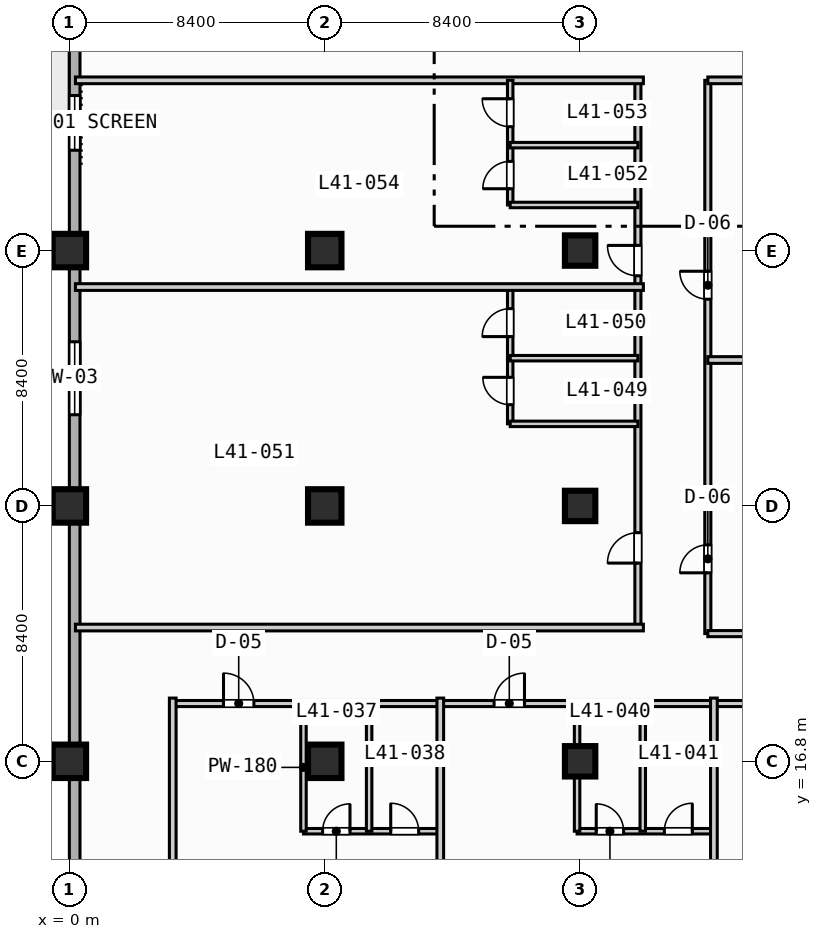
"""IFC4 building model, lengths in metres.
Left out: names, types, materials, properties, quantities, classifications, styles, units other than length and angle.
Written with IfcOpenShell. Run it as: python <this file> out.ifc"""

import sys

from ifc_helpers import new_model, si_unit, direction, frame, frame_2d, origin, origin_2d, place, context, subcontext, project, spatial, rectangle, extrude, element, fill, save


model = new_model("IFC4")
c1 = context("Model", 3, precision=1e-05, world=origin(), true_north=direction((0.0, 1.0)))
c2 = subcontext(c1, "Body", "Model", "MODEL_VIEW")
j1 = project(units=[si_unit("LENGTHUNIT", "METRE"), si_unit("PLANEANGLEUNIT", "RADIAN")], contexts=[c1])
p1 = place(None, origin())
s1 = spatial("IfcSite", under=j1, at=p1, CompositionType="ELEMENT")
p2 = place(p1, origin())
s2 = spatial("IfcBuilding", under=s1, at=p2, CompositionType="ELEMENT")
p3 = place(p2, frame((0.0, 0.0, 171.7)))
s3 = spatial("IfcBuildingStorey", under=s2, at=p3, CompositionType="ELEMENT", Elevation=171.7)
for number, where, z_axis, x_axis in (
    (1, (0.0, 16.8, 0.0), (0.0, 0.0, 1.0), (1.0, 0.0, 0.0)),
    (2, (0.0, 25.2, 0.0), (0.0, 0.0, 1.0), (1.0, 0.0, 0.0)),
    (3, (0.0, 33.6, 0.0), (0.0, 0.0, 1.0), (1.0, 0.0, 0.0)),
    (4, (8.4, 16.8, 0.0), (0.0, 0.0, 1.0), (1.0, 0.0, 0.0)),
    (5, (8.4, 25.2, 0.0), (0.0, 0.0, 1.0), (1.0, 0.0, 0.0)),
    (6, (8.4, 33.6, 0.0), (0.0, 0.0, 1.0), (1.0, 0.0, 0.0)),
):
    element("IfcColumn", number, at=place(p3, frame(where, z_axis=z_axis, x_axis=x_axis)), inside=s3, PredefinedType="COLUMN", context=c2, shape_type="SweptSolid", body=[
        extrude(rectangle(XDim=1.1, YDim=1.1, at=origin_2d()), origin(), (0.0, 0.0, 1.0), 3.7),
    ])
for number, where, z_axis, x_axis in (
    (7, (16.8, 16.8, 0.0), (0.0, 0.0, 1.0), (1.0, 0.0, 0.0)),
    (8, (16.8, 25.2, 0.0), (0.0, 0.0, 1.0), (1.0, 0.0, 0.0)),
    (9, (16.8, 33.6, 0.0), (0.0, 0.0, 1.0), (1.0, 0.0, 0.0)),
):
    element("IfcColumn", number, at=place(p3, frame(where, z_axis=z_axis, x_axis=x_axis)), inside=s3, PredefinedType="COLUMN", context=c2, shape_type="SweptSolid", body=[
        extrude(rectangle(XDim=1.0, YDim=1.0, at=origin_2d()), origin(), (0.0, 0.0, 1.0), 3.7),
    ])
p4 = place(p3, frame((0.175, 3.175, 0.0), z_axis=(0.0, 0.0, 1.0), x_axis=(0.0, 1.0, 0.0)))
e10 = element("IfcWall", 10, at=p4, inside=s3, PredefinedType="STANDARD", context=c2, shape_type="SweptSolid", body=[
    extrude(rectangle(XDim=69.25, YDim=0.35, at=frame_2d((34.625, 0.0))), origin(), (0.0, 0.0, 1.0), 3.47),
])
p5 = place(p4, frame((42.325, 0.0, 0.0)))
e11 = element("IfcOpeningElement", 11, at=p5, cuts=e10, PredefinedType="OPENING", context=c2, shape_type="SweptSolid", body=[
    extrude(rectangle(XDim=1.4, YDim=2.2, at=frame_2d((0.7, 1.1))), frame((0.0, 0.185, 0.0), z_axis=(0.0, -1.0, 0.0), x_axis=(1.0, 0.0, 0.0)), (0.0, 0.0, 1.0), 0.37),
])
p6 = place(p4, frame((25.025, 0.0, 0.85)))
e12 = element("IfcOpeningElement", 12, at=p6, cuts=e10, PredefinedType="OPENING", context=c2, shape_type="SweptSolid", body=[
    extrude(rectangle(XDim=2.4, YDim=1.95, at=frame_2d((1.2, 0.975))), frame((0.0, 0.185, 0.0), z_axis=(0.0, -1.0, 0.0), x_axis=(1.0, 0.0, 0.0)), (0.0, 0.0, 1.0), 0.37),
])
p7 = place(p4, frame((33.725, 0.0, 0.85)))
e13 = element("IfcOpeningElement", 13, at=p7, cuts=e10, PredefinedType="OPENING", context=c2, shape_type="SweptSolid", body=[
    extrude(rectangle(XDim=1.8, YDim=1.8, at=frame_2d((0.9, 0.9))), frame((0.0, 0.185, 0.0), z_axis=(0.0, -1.0, 0.0), x_axis=(1.0, 0.0, 0.0)), (0.0, 0.0, 1.0), 0.37),
])
p8 = place(p4, frame((58.625, 0.0, 0.85)))
e14 = element("IfcOpeningElement", 14, at=p8, cuts=e10, PredefinedType="OPENING", context=c2, shape_type="SweptSolid", body=[
    extrude(rectangle(XDim=2.4, YDim=1.95, at=frame_2d((1.2, 0.975))), frame((0.0, 0.185, 0.0), z_axis=(0.0, -1.0, 0.0), x_axis=(1.0, 0.0, 0.0)), (0.0, 0.0, 1.0), 0.37),
])
p9 = place(p3, frame((21.0, 21.0, 0.0), z_axis=(0.0, 0.0, 1.0), x_axis=(0.0, 1.0, 0.0)))
e15 = element("IfcWall", 15, at=p9, inside=s3, PredefinedType="PARTITIONING", context=c2, shape_type="SweptSolid", body=[
    extrude(rectangle(XDim=18.2, YDim=0.2, at=frame_2d((9.1, 0.0))), origin(), (0.0, 0.0, 1.0), 3.47),
])
p10 = place(p9, frame((2.0, 0.0, 0.0)))
e16 = element("IfcOpeningElement", 16, at=p10, cuts=e15, PredefinedType="OPENING", context=c2, shape_type="SweptSolid", body=[
    extrude(rectangle(XDim=0.92, YDim=2.1, at=frame_2d((0.46, 1.05))), frame((0.0, 0.11, 0.0), z_axis=(0.0, -1.0, 0.0), x_axis=(1.0, 0.0, 0.0)), (0.0, 0.0, 1.0), 0.22),
])
p11 = place(p9, frame((11.0, 0.0, 0.0)))
e17 = element("IfcOpeningElement", 17, at=p11, cuts=e15, PredefinedType="OPENING", context=c2, shape_type="SweptSolid", body=[
    extrude(rectangle(XDim=0.92, YDim=2.1, at=frame_2d((0.46, 1.05))), frame((0.0, 0.11, 0.0), z_axis=(0.0, -1.0, 0.0), x_axis=(1.0, 0.0, 0.0)), (0.0, 0.0, 1.0), 0.22),
])
p12 = place(p3, frame((21.0, 21.0, 0.0), z_axis=(0.0, 0.0, 1.0), x_axis=(1.0, 0.0, 0.0)))
e18 = element("IfcWall", 18, at=p12, inside=s3, PredefinedType="PARTITIONING", context=c2, shape_type="SweptSolid", body=[
    extrude(rectangle(XDim=12.3, YDim=0.2, at=frame_2d((6.15, 0.0))), origin(), (0.0, 0.0, 1.0), 3.47),
])
for number, where, z_axis, x_axis in (
    (19, (21.0, 30.0, 0.0), (0.0, 0.0, 1.0), (1.0, 0.0, 0.0)),
    (20, (21.0, 39.2, 0.0), (0.0, 0.0, 1.0), (1.0, 0.0, 0.0)),
):
    element("IfcWall", number, at=place(p3, frame(where, z_axis=z_axis, x_axis=x_axis)), inside=s3, PredefinedType="PARTITIONING", context=c2, shape_type="SweptSolid", body=[
        extrude(rectangle(XDim=12.3, YDim=0.22, at=frame_2d((6.15, 0.0))), origin(), (0.0, 0.0, 1.0), 3.47),
    ])
p13 = place(p3, frame((3.4, 18.7, 0.0), z_axis=(0.0, 0.0, 1.0), x_axis=(1.0, 0.0, 0.0)))
e21 = element("IfcWall", 21, at=p13, inside=s3, PredefinedType="PARTITIONING", context=c2, shape_type="SweptSolid", body=[
    extrude(rectangle(XDim=35.8, YDim=0.2, at=frame_2d((17.9, 0.0))), origin(), (0.0, 0.0, 1.0), 3.47),
])
p14 = place(p13, frame((1.67, 0.0, 0.0)))
e22 = element("IfcOpeningElement", 22, at=p14, cuts=e21, PredefinedType="OPENING", context=c2, shape_type="SweptSolid", body=[
    extrude(rectangle(XDim=1.0, YDim=2.15, at=frame_2d((0.5, 1.075))), frame((0.0, 0.11, 0.0), z_axis=(0.0, -1.0, 0.0), x_axis=(1.0, 0.0, 0.0)), (0.0, 0.0, 1.0), 0.22),
])
p15 = place(p13, frame((10.57, 0.0, 0.0)))
e23 = element("IfcOpeningElement", 23, at=p15, cuts=e21, PredefinedType="OPENING", context=c2, shape_type="SweptSolid", body=[
    extrude(rectangle(XDim=1.0, YDim=2.15, at=frame_2d((0.5, 1.075))), frame((0.0, 0.11, 0.0), z_axis=(0.0, -1.0, 0.0), x_axis=(1.0, 0.0, 0.0)), (0.0, 0.0, 1.0), 0.22),
])
p16 = place(p13, frame((19.47, 0.0, 0.0)))
e24 = element("IfcOpeningElement", 24, at=p16, cuts=e21, PredefinedType="OPENING", context=c2, shape_type="SweptSolid", body=[
    extrude(rectangle(XDim=1.0, YDim=2.15, at=frame_2d((0.5, 1.075))), frame((0.0, 0.11, 0.0), z_axis=(0.0, -1.0, 0.0), x_axis=(1.0, 0.0, 0.0)), (0.0, 0.0, 1.0), 0.22),
])
p17 = place(p13, frame((28.22, 0.0, 0.0)))
e25 = element("IfcOpeningElement", 25, at=p17, cuts=e21, PredefinedType="OPENING", context=c2, shape_type="SweptSolid", body=[
    extrude(rectangle(XDim=1.0, YDim=2.15, at=frame_2d((0.5, 1.075))), frame((0.0, 0.11, 0.0), z_axis=(0.0, -1.0, 0.0), x_axis=(1.0, 0.0, 0.0)), (0.0, 0.0, 1.0), 0.22),
])
p18 = place(p3, frame((3.4, 0.2, 0.0), z_axis=(0.0, 0.0, 1.0), x_axis=(0.0, 1.0, 0.0)))
e26 = element("IfcWall", 26, at=p18, inside=s3, PredefinedType="PARTITIONING", context=c2, shape_type="SweptSolid", body=[
    extrude(rectangle(XDim=18.68, YDim=0.22, at=frame_2d((9.34, 0.0))), origin(), (0.0, 0.0, 1.0), 3.47),
])
p19 = place(p3, frame((7.7, 14.5, 0.0), z_axis=(0.0, 0.0, 1.0), x_axis=(1.0, 0.0, 0.0)))
e27 = element("IfcWall", 27, at=p19, inside=s3, PredefinedType="PLUMBINGWALL", context=c2, shape_type="SweptSolid", body=[
    extrude(rectangle(XDim=4.5, YDim=0.18, at=frame_2d((2.25, 0.0))), origin(), (0.0, 0.0, 1.0), 3.47),
])
p20 = place(p19, frame((0.63, 0.0, 0.0)))
e28 = element("IfcOpeningElement", 28, at=p20, cuts=e27, PredefinedType="OPENING", context=c2, shape_type="SweptSolid", body=[
    extrude(rectangle(XDim=0.9, YDim=2.1, at=frame_2d((0.45, 1.05))), frame((0.0, 0.1, 0.0), z_axis=(0.0, -1.0, 0.0), x_axis=(1.0, 0.0, 0.0)), (0.0, 0.0, 1.0), 0.2),
])
p21 = place(p19, frame((2.87, 0.0, 0.0)))
e29 = element("IfcOpeningElement", 29, at=p21, cuts=e27, PredefinedType="OPENING", context=c2, shape_type="SweptSolid", body=[
    extrude(rectangle(XDim=0.92, YDim=2.1, at=frame_2d((0.46, 1.05))), frame((0.0, 0.1, 0.0), z_axis=(0.0, -1.0, 0.0), x_axis=(1.0, 0.0, 0.0)), (0.0, 0.0, 1.0), 0.2),
])
for number, where, z_axis, x_axis in (
    (30, (7.7, 14.5, 0.0), (0.0, 0.0, 1.0), (0.0, 1.0, 0.0)),
    (31, (9.86, 14.5, 0.0), (0.0, 0.0, 1.0), (0.0, 1.0, 0.0)),
):
    element("IfcWall", number, at=place(p3, frame(where, z_axis=z_axis, x_axis=x_axis)), inside=s3, PredefinedType="PLUMBINGWALL", context=c2, shape_type="SweptSolid", body=[
        extrude(rectangle(XDim=4.2, YDim=0.18, at=frame_2d((2.1, 0.0))), origin(), (0.0, 0.0, 1.0), 3.47),
    ])
p22 = place(p3, frame((12.2, 0.2, 0.0), z_axis=(0.0, 0.0, 1.0), x_axis=(0.0, 1.0, 0.0)))
e32 = element("IfcWall", 32, at=p22, inside=s3, PredefinedType="PARTITIONING", context=c2, shape_type="SweptSolid", body=[
    extrude(rectangle(XDim=18.68, YDim=0.22, at=frame_2d((9.34, 0.0))), origin(), (0.0, 0.0, 1.0), 3.47),
])
p23 = place(p3, frame((16.7, 14.5, 0.0), z_axis=(0.0, 0.0, 1.0), x_axis=(1.0, 0.0, 0.0)))
e33 = element("IfcWall", 33, at=p23, inside=s3, PredefinedType="PLUMBINGWALL", context=c2, shape_type="SweptSolid", body=[
    extrude(rectangle(XDim=4.5, YDim=0.18, at=frame_2d((2.25, 0.0))), origin(), (0.0, 0.0, 1.0), 3.47),
])
p24 = place(p23, frame((0.63, 0.0, 0.0)))
e34 = element("IfcOpeningElement", 34, at=p24, cuts=e33, PredefinedType="OPENING", context=c2, shape_type="SweptSolid", body=[
    extrude(rectangle(XDim=0.9, YDim=2.1, at=frame_2d((0.45, 1.05))), frame((0.0, 0.1, 0.0), z_axis=(0.0, -1.0, 0.0), x_axis=(1.0, 0.0, 0.0)), (0.0, 0.0, 1.0), 0.2),
])
p25 = place(p23, frame((2.87, 0.0, 0.0)))
e35 = element("IfcOpeningElement", 35, at=p25, cuts=e33, PredefinedType="OPENING", context=c2, shape_type="SweptSolid", body=[
    extrude(rectangle(XDim=0.92, YDim=2.1, at=frame_2d((0.46, 1.05))), frame((0.0, 0.1, 0.0), z_axis=(0.0, -1.0, 0.0), x_axis=(1.0, 0.0, 0.0)), (0.0, 0.0, 1.0), 0.2),
])
p26 = place(p3, frame((16.7, 14.5, 0.0), z_axis=(0.0, 0.0, 1.0), x_axis=(0.0, 1.0, 0.0)))
e36 = element("IfcWall", 36, at=p26, inside=s3, PredefinedType="PLUMBINGWALL", context=c2, shape_type="SweptSolid", body=[
    extrude(rectangle(XDim=4.2, YDim=0.18, at=frame_2d((2.1, 0.0))), origin(), (0.0, 0.0, 1.0), 2.82),
])
p27 = place(p3, frame((18.86, 14.5, 0.0), z_axis=(0.0, 0.0, 1.0), x_axis=(0.0, 1.0, 0.0)))
e37 = element("IfcWall", 37, at=p27, inside=s3, PredefinedType="PLUMBINGWALL", context=c2, shape_type="SweptSolid", body=[
    extrude(rectangle(XDim=4.2, YDim=0.18, at=frame_2d((2.1, 0.0))), origin(), (0.0, 0.0, 1.0), 3.47),
])
p28 = place(p3, frame((21.2, 0.2, 0.0), z_axis=(0.0, 0.0, 1.0), x_axis=(0.0, 1.0, 0.0)))
e38 = element("IfcWall", 38, at=p28, inside=s3, PredefinedType="PARTITIONING", context=c2, shape_type="SweptSolid", body=[
    extrude(rectangle(XDim=18.68, YDim=0.22, at=frame_2d((9.34, 0.0))), origin(), (0.0, 0.0, 1.0), 3.47),
])
p29 = place(p3, frame((18.7, 21.2, 0.0), z_axis=(0.0, 0.0, 1.0), x_axis=(0.0, 1.0, 0.0)))
e39 = element("IfcWall", 39, at=p29, inside=s3, PredefinedType="PARTITIONING", context=c2, shape_type="SweptSolid", body=[
    extrude(rectangle(XDim=18.0, YDim=0.2, at=frame_2d((9.0, 0.0))), origin(), (0.0, 0.0, 1.0), 3.47),
])
p30 = place(p29, frame((2.12, 0.0, 0.0)))
e40 = element("IfcOpeningElement", 40, at=p30, cuts=e39, PredefinedType="OPENING", context=c2, shape_type="SweptSolid", body=[
    extrude(rectangle(XDim=1.0, YDim=2.15, at=frame_2d((0.5, 1.075))), frame((0.0, 0.11, 0.0), z_axis=(0.0, -1.0, 0.0), x_axis=(1.0, 0.0, 0.0)), (0.0, 0.0, 1.0), 0.22),
])
p31 = place(p29, frame((11.57, 0.0, 0.0)))
e41 = element("IfcOpeningElement", 41, at=p31, cuts=e39, PredefinedType="OPENING", context=c2, shape_type="SweptSolid", body=[
    extrude(rectangle(XDim=1.0, YDim=2.15, at=frame_2d((0.5, 1.075))), frame((0.0, 0.11, 0.0), z_axis=(0.0, -1.0, 0.0), x_axis=(1.0, 0.0, 0.0)), (0.0, 0.0, 1.0), 0.22),
])
p32 = place(p3, frame((0.2, 21.2, 0.0), z_axis=(0.0, 0.0, 1.0), x_axis=(1.0, 0.0, 0.0)))
e42 = element("IfcWall", 42, at=p32, inside=s3, PredefinedType="PARTITIONING", context=c2, shape_type="SweptSolid", body=[
    extrude(rectangle(XDim=18.68, YDim=0.22, at=frame_2d((9.34, 0.0))), origin(), (0.0, 0.0, 1.0), 3.47),
])
p33 = place(p3, frame((14.5, 27.9, 0.0), z_axis=(0.0, 0.0, 1.0), x_axis=(0.0, 1.0, 0.0)))
e43 = element("IfcWall", 43, at=p33, inside=s3, PredefinedType="PLUMBINGWALL", context=c2, shape_type="SweptSolid", body=[
    extrude(rectangle(XDim=4.5, YDim=0.18, at=frame_2d((2.25, 0.0))), origin(), (0.0, 0.0, 1.0), 3.47),
])
p34 = place(p33, frame((0.63, 0.0, 0.0)))
e44 = element("IfcOpeningElement", 44, at=p34, cuts=e43, PredefinedType="OPENING", context=c2, shape_type="SweptSolid", body=[
    extrude(rectangle(XDim=0.9, YDim=2.1, at=frame_2d((0.45, 1.05))), frame((0.0, 0.1, 0.0), z_axis=(0.0, -1.0, 0.0), x_axis=(1.0, 0.0, 0.0)), (0.0, 0.0, 1.0), 0.2),
])
p35 = place(p33, frame((2.87, 0.0, 0.0)))
e45 = element("IfcOpeningElement", 45, at=p35, cuts=e43, PredefinedType="OPENING", context=c2, shape_type="SweptSolid", body=[
    extrude(rectangle(XDim=0.92, YDim=2.1, at=frame_2d((0.46, 1.05))), frame((0.0, 0.1, 0.0), z_axis=(0.0, -1.0, 0.0), x_axis=(1.0, 0.0, 0.0)), (0.0, 0.0, 1.0), 0.2),
])
for number, where, z_axis, x_axis in (
    (46, (14.5, 27.9, 0.0), (0.0, 0.0, 1.0), (1.0, 0.0, 0.0)),
    (47, (14.5, 30.06, 0.0), (0.0, 0.0, 1.0), (1.0, 0.0, 0.0)),
):
    element("IfcWall", number, at=place(p3, frame(where, z_axis=z_axis, x_axis=x_axis)), inside=s3, PredefinedType="PLUMBINGWALL", context=c2, shape_type="SweptSolid", body=[
        extrude(rectangle(XDim=4.2, YDim=0.18, at=frame_2d((2.1, 0.0))), origin(), (0.0, 0.0, 1.0), 3.47),
    ])
for number, where, z_axis, x_axis in (
    (48, (0.2, 32.4, 0.0), (0.0, 0.0, 1.0), (1.0, 0.0, 0.0)),
    (49, (0.2, 39.2, 0.0), (0.0, 0.0, 1.0), (1.0, 0.0, 0.0)),
):
    element("IfcWall", number, at=place(p3, frame(where, z_axis=z_axis, x_axis=x_axis)), inside=s3, PredefinedType="PARTITIONING", context=c2, shape_type="SweptSolid", body=[
        extrude(rectangle(XDim=18.68, YDim=0.22, at=frame_2d((9.34, 0.0))), origin(), (0.0, 0.0, 1.0), 3.47),
    ])
p36 = place(p3, frame((14.5, 35.1, 0.0), z_axis=(0.0, 0.0, 1.0), x_axis=(0.0, 1.0, 0.0)))
e50 = element("IfcWall", 50, at=p36, inside=s3, PredefinedType="PLUMBINGWALL", context=c2, shape_type="SweptSolid", body=[
    extrude(rectangle(XDim=4.1, YDim=0.18, at=frame_2d((2.05, 0.0))), origin(), (0.0, 0.0, 1.0), 3.47),
])
p37 = place(p36, frame((0.534, 0.0, 0.0)))
e51 = element("IfcOpeningElement", 51, at=p37, cuts=e50, PredefinedType="OPENING", context=c2, shape_type="SweptSolid", body=[
    extrude(rectangle(XDim=0.9, YDim=2.1, at=frame_2d((0.45, 1.05))), frame((0.0, 0.1, 0.0), z_axis=(0.0, -1.0, 0.0), x_axis=(1.0, 0.0, 0.0)), (0.0, 0.0, 1.0), 0.2),
])
p38 = place(p36, frame((2.574, 0.0, 0.0)))
e52 = element("IfcOpeningElement", 52, at=p38, cuts=e50, PredefinedType="OPENING", context=c2, shape_type="SweptSolid", body=[
    extrude(rectangle(XDim=0.92, YDim=2.1, at=frame_2d((0.46, 1.05))), frame((0.0, 0.1, 0.0), z_axis=(0.0, -1.0, 0.0), x_axis=(1.0, 0.0, 0.0)), (0.0, 0.0, 1.0), 0.2),
])
for number, where, z_axis, x_axis in (
    (53, (14.5, 35.1, 0.0), (0.0, 0.0, 1.0), (1.0, 0.0, 0.0)),
    (54, (14.5, 37.068, 0.0), (0.0, 0.0, 1.0), (1.0, 0.0, 0.0)),
):
    element("IfcWall", number, at=place(p3, frame(where, z_axis=z_axis, x_axis=x_axis)), inside=s3, PredefinedType="PLUMBINGWALL", context=c2, shape_type="SweptSolid", body=[
        extrude(rectangle(XDim=4.2, YDim=0.18, at=frame_2d((2.1, 0.0))), origin(), (0.0, 0.0, 1.0), 3.47),
    ])
p39 = place(p6, origin())
e55 = element("IfcWindow", 55, at=p39, inside=s3, PartitioningType="SINGLE_PANEL", PredefinedType="WINDOW", context=c2, shape_type="SweptSolid", body=[
    extrude(rectangle(XDim=2.4, YDim=1.95, at=frame_2d((1.2, 0.975))), frame((0.0, 0.03, 0.0), z_axis=(0.0, -1.0, 0.0), x_axis=(1.0, 0.0, 0.0)), (0.0, 0.0, 1.0), 0.06),
])
fill(e12, e55)
p40 = place(p7, origin())
e56 = element("IfcWindow", 56, at=p40, inside=s3, PartitioningType="SINGLE_PANEL", PredefinedType="WINDOW", context=c2, shape_type="SweptSolid", body=[
    extrude(rectangle(XDim=1.8, YDim=1.8, at=frame_2d((0.9, 0.9))), frame((0.0, 0.03, 0.0), z_axis=(0.0, -1.0, 0.0), x_axis=(1.0, 0.0, 0.0)), (0.0, 0.0, 1.0), 0.06),
])
fill(e13, e56)
p41 = place(p10, origin())
e57 = element("IfcDoor", 57, at=p41, inside=s3, OperationType="SINGLE_SWING_LEFT", PredefinedType="DOOR", context=c2, shape_type="SweptSolid", body=[
    extrude(rectangle(XDim=0.92, YDim=2.1, at=frame_2d((0.46, 1.05))), frame((0.0, 0.025, 0.0), z_axis=(0.0, -1.0, 0.0), x_axis=(1.0, 0.0, 0.0)), (0.0, 0.0, 1.0), 0.05),
])
fill(e16, e57)
p42 = place(p11, origin())
e58 = element("IfcDoor", 58, at=p42, inside=s3, OperationType="SINGLE_SWING_RIGHT", PredefinedType="DOOR", context=c2, shape_type="SweptSolid", body=[
    extrude(rectangle(XDim=0.92, YDim=2.1, at=frame_2d((0.46, 1.05))), frame((0.0, 0.025, 0.0), z_axis=(0.0, -1.0, 0.0), x_axis=(1.0, 0.0, 0.0)), (0.0, 0.0, 1.0), 0.05),
])
fill(e17, e58)
p43 = place(p14, origin())
e59 = element("IfcDoor", 59, at=p43, inside=s3, OperationType="SINGLE_SWING_LEFT", PredefinedType="DOOR", context=c2, shape_type="SweptSolid", body=[
    extrude(rectangle(XDim=1.0, YDim=2.15, at=frame_2d((0.5, 1.075))), frame((0.0, 0.025, 0.0), z_axis=(0.0, -1.0, 0.0), x_axis=(1.0, 0.0, 0.0)), (0.0, 0.0, 1.0), 0.05),
])
fill(e22, e59)
p44 = place(p15, origin())
e60 = element("IfcDoor", 60, at=p44, inside=s3, OperationType="SINGLE_SWING_RIGHT", PredefinedType="DOOR", context=c2, shape_type="SweptSolid", body=[
    extrude(rectangle(XDim=1.0, YDim=2.15, at=frame_2d((0.5, 1.075))), frame((0.0, 0.025, 0.0), z_axis=(0.0, -1.0, 0.0), x_axis=(1.0, 0.0, 0.0)), (0.0, 0.0, 1.0), 0.05),
])
fill(e23, e60)
p45 = place(p20, origin())
e61 = element("IfcDoor", 61, at=p45, inside=s3, OperationType="SINGLE_SWING_RIGHT", PredefinedType="DOOR", context=c2, shape_type="SweptSolid", body=[
    extrude(rectangle(XDim=0.9, YDim=2.1, at=frame_2d((0.45, 1.05))), frame((0.0, 0.025, 0.0), z_axis=(0.0, -1.0, 0.0), x_axis=(1.0, 0.0, 0.0)), (0.0, 0.0, 1.0), 0.05),
])
fill(e28, e61)
p46 = place(p21, origin())
e62 = element("IfcDoor", 62, at=p46, inside=s3, OperationType="SINGLE_SWING_LEFT", PredefinedType="DOOR", context=c2, shape_type="SweptSolid", body=[
    extrude(rectangle(XDim=0.92, YDim=2.1, at=frame_2d((0.46, 1.05))), frame((0.0, 0.025, 0.0), z_axis=(0.0, -1.0, 0.0), x_axis=(1.0, 0.0, 0.0)), (0.0, 0.0, 1.0), 0.05),
])
fill(e29, e62)
p47 = place(p24, origin())
e63 = element("IfcDoor", 63, at=p47, inside=s3, OperationType="SINGLE_SWING_LEFT", PredefinedType="DOOR", context=c2, shape_type="SweptSolid", body=[
    extrude(rectangle(XDim=0.9, YDim=2.1, at=frame_2d((0.45, 1.05))), frame((0.0, 0.025, 0.0), z_axis=(0.0, -1.0, 0.0), x_axis=(1.0, 0.0, 0.0)), (0.0, 0.0, 1.0), 0.05),
])
fill(e34, e63)
p48 = place(p25, origin())
e64 = element("IfcDoor", 64, at=p48, inside=s3, OperationType="SINGLE_SWING_RIGHT", PredefinedType="DOOR", context=c2, shape_type="SweptSolid", body=[
    extrude(rectangle(XDim=0.92, YDim=2.1, at=frame_2d((0.46, 1.05))), frame((0.0, 0.025, 0.0), z_axis=(0.0, -1.0, 0.0), x_axis=(1.0, 0.0, 0.0)), (0.0, 0.0, 1.0), 0.05),
])
fill(e35, e64)
p49 = place(p30, origin())
e65 = element("IfcDoor", 65, at=p49, inside=s3, OperationType="SINGLE_SWING_LEFT", PredefinedType="DOOR", context=c2, shape_type="SweptSolid", body=[
    extrude(rectangle(XDim=1.0, YDim=2.15, at=frame_2d((0.5, 1.075))), frame((0.0, 0.025, 0.0), z_axis=(0.0, -1.0, 0.0), x_axis=(1.0, 0.0, 0.0)), (0.0, 0.0, 1.0), 0.05),
])
fill(e40, e65)
p50 = place(p31, origin())
e66 = element("IfcDoor", 66, at=p50, inside=s3, OperationType="SINGLE_SWING_RIGHT", PredefinedType="DOOR", context=c2, shape_type="SweptSolid", body=[
    extrude(rectangle(XDim=1.0, YDim=2.15, at=frame_2d((0.5, 1.075))), frame((0.0, 0.025, 0.0), z_axis=(0.0, -1.0, 0.0), x_axis=(1.0, 0.0, 0.0)), (0.0, 0.0, 1.0), 0.05),
])
fill(e41, e66)
p51 = place(p34, origin())
e67 = element("IfcDoor", 67, at=p51, inside=s3, OperationType="SINGLE_SWING_RIGHT", PredefinedType="DOOR", context=c2, shape_type="SweptSolid", body=[
    extrude(rectangle(XDim=0.9, YDim=2.1, at=frame_2d((0.45, 1.05))), frame((0.0, 0.025, 0.0), z_axis=(0.0, -1.0, 0.0), x_axis=(1.0, 0.0, 0.0)), (0.0, 0.0, 1.0), 0.05),
])
fill(e44, e67)
p52 = place(p35, origin())
e68 = element("IfcDoor", 68, at=p52, inside=s3, OperationType="SINGLE_SWING_LEFT", PredefinedType="DOOR", context=c2, shape_type="SweptSolid", body=[
    extrude(rectangle(XDim=0.92, YDim=2.1, at=frame_2d((0.46, 1.05))), frame((0.0, 0.025, 0.0), z_axis=(0.0, -1.0, 0.0), x_axis=(1.0, 0.0, 0.0)), (0.0, 0.0, 1.0), 0.05),
])
fill(e45, e68)
p53 = place(p37, origin())
e69 = element("IfcDoor", 69, at=p53, inside=s3, OperationType="SINGLE_SWING_LEFT", PredefinedType="DOOR", context=c2, shape_type="SweptSolid", body=[
    extrude(rectangle(XDim=0.9, YDim=2.1, at=frame_2d((0.45, 1.05))), frame((0.0, 0.025, 0.0), z_axis=(0.0, -1.0, 0.0), x_axis=(1.0, 0.0, 0.0)), (0.0, 0.0, 1.0), 0.05),
])
fill(e51, e69)
p54 = place(p38, origin())
e70 = element("IfcDoor", 70, at=p54, inside=s3, OperationType="SINGLE_SWING_RIGHT", PredefinedType="DOOR", context=c2, shape_type="SweptSolid", body=[
    extrude(rectangle(XDim=0.92, YDim=2.1, at=frame_2d((0.46, 1.05))), frame((0.0, 0.025, 0.0), z_axis=(0.0, -1.0, 0.0), x_axis=(1.0, 0.0, 0.0)), (0.0, 0.0, 1.0), 0.05),
])
fill(e52, e70)
save(model, sys.argv[1])
